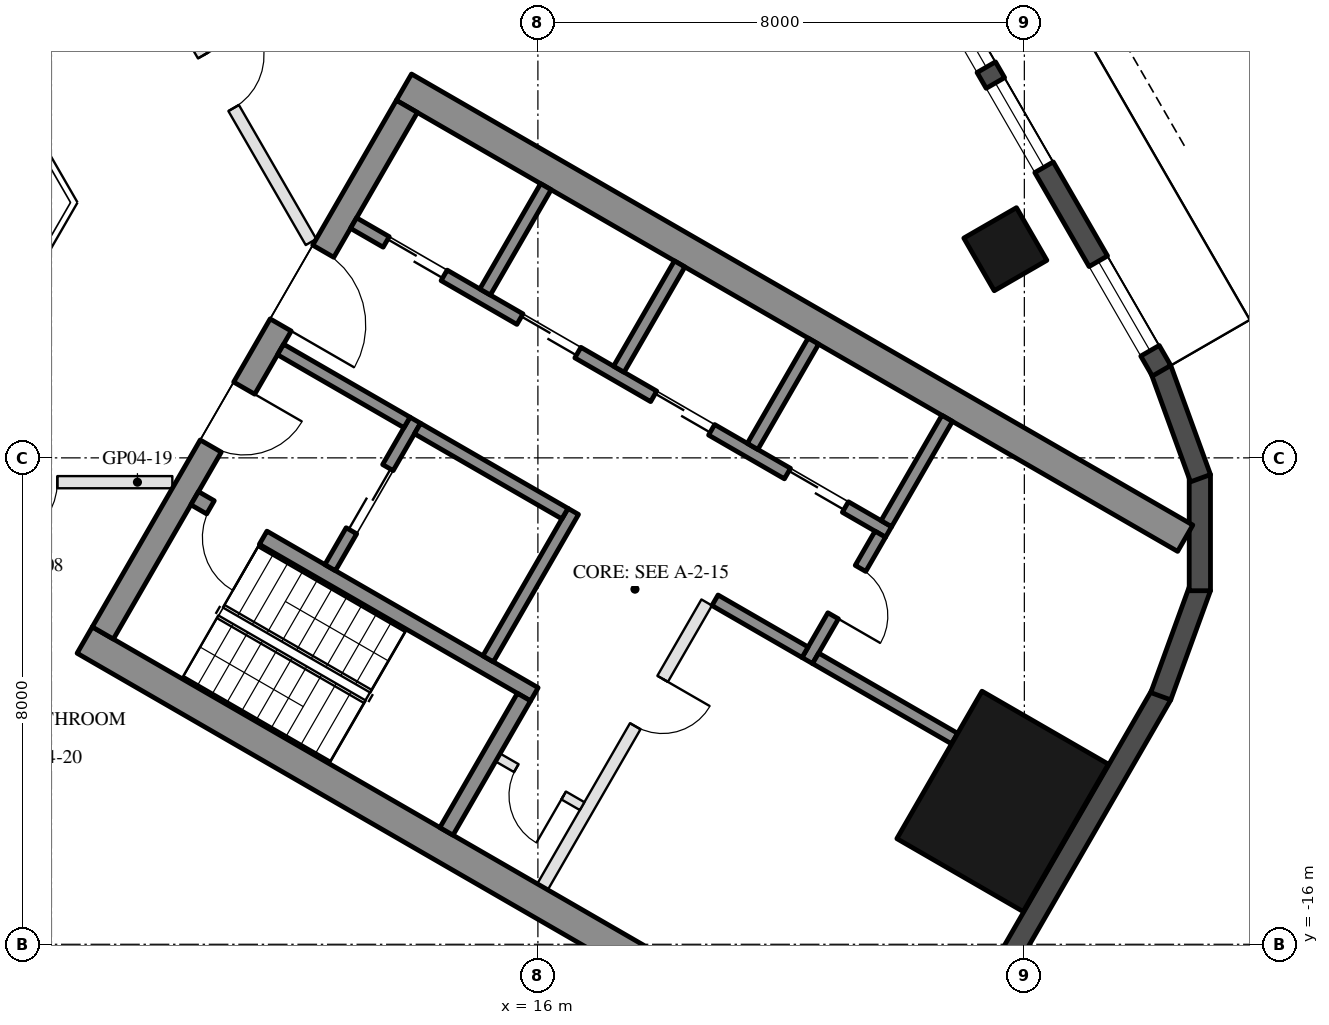
"""IFC4 building model, lengths in metres.
Left out: names, types, materials, properties, quantities, classifications, styles, units other than length and angle.
Written with IfcOpenShell. Run it as: python <this file> out.ifc"""

import sys

from ifc_helpers import new_model, si_unit, direction, frame, frame_2d, origin, origin_2d, place, context, subcontext, project, spatial, rectangle, hollow_rectangle, extrude, element, fill, save


model = new_model("IFC4")
c1 = context("Model", 3, precision=1e-05, world=origin(), true_north=direction((0.0, 1.0)))
c2 = subcontext(c1, "Body", "Model", "MODEL_VIEW")
j1 = project(units=[si_unit("LENGTHUNIT", "METRE"), si_unit("PLANEANGLEUNIT", "RADIAN")], contexts=[c1])
p1 = place(None, origin())
s1 = spatial("IfcSite", under=j1, at=p1, CompositionType="ELEMENT")
p2 = place(p1, origin())
s2 = spatial("IfcBuilding", under=s1, at=p2, CompositionType="ELEMENT")
p3 = place(p2, frame((0.0, 0.0, 76.1)))
s3 = spatial("IfcBuildingStorey", under=s2, at=p3, CompositionType="ELEMENT", Elevation=76.1)
p4 = place(p3, frame((23.688, -4.568, 0.0), z_axis=(0.0, 0.0, 1.0), x_axis=(-0.5, 0.866025403784, 0.0)))
e1 = element("IfcColumn", 1, at=p4, inside=s3, PredefinedType="COLUMN", context=c2, shape_type="SweptSolid", body=[
    extrude(hollow_rectangle(XDim=1.0, YDim=1.0, WallThickness=0.045, at=origin_2d()), origin(), (0.0, 0.0, 1.0), 3.7),
])
p5 = place(p3, frame((23.643, -13.65, 0.0), z_axis=(0.0, 0.0, 1.0), x_axis=(0.5, 0.866025403784, 0.0)))
e2 = element("IfcColumn", 2, at=p5, inside=s3, PredefinedType="COLUMN", context=c2, shape_type="SweptSolid", body=[
    extrude(hollow_rectangle(XDim=2.8, YDim=2.4, WallThickness=0.07, at=origin_2d()), origin(), (0.0, 0.0, 1.0), 3.7),
])
p6 = place(p3, frame((23.427, -16.792, 0.0), z_axis=(0.0, 0.0, 1.0), x_axis=(0.500018773155, 0.866014564827, 0.0)))
e3 = element("IfcWall", 3, at=p6, inside=s3, PredefinedType="SOLIDWALL", context=c2, shape_type="SweptSolid", body=[
    extrude(rectangle(XDim=5.658, YDim=0.35, at=frame_2d((2.829, 0.0))), origin(), (0.0, 0.0, 1.0), 3.55),
])
for number, where, z_axis, x_axis in (
    (4, (26.244, -11.92, 0.0), (0.0, 0.0, 1.0), (0.342, 0.94, 0.0)),
    (5, (26.886, -10.185, 0.0), (0.0, 0.0, 1.0), (0.0, 1.0, 0.0)),
    (6, (26.897, -8.335, 0.0), (0.0, 0.0, 1.0), (-0.342, 0.94, 0.0)),
):
    element("IfcWall", number, at=place(p3, frame(where, z_axis=z_axis, x_axis=x_axis)), inside=s3, PredefinedType="SOLIDWALL", context=c2, shape_type="SweptSolid", body=[
        extrude(rectangle(XDim=1.91, YDim=0.35, at=frame_2d((0.955, 0.0))), origin(), (0.0, 0.0, 1.0), 3.55),
    ])
p7 = place(p3, frame((26.257, -6.567, 0.0), z_axis=(0.0, 0.0, 1.0), x_axis=(-0.500023526245, 0.866011820475, 0.0)))
e7 = element("IfcWall", 7, at=p7, inside=s3, PredefinedType="SOLIDWALL", context=c2, shape_type="SweptSolid", body=[
    extrude(rectangle(XDim=11.816, YDim=0.35, at=frame_2d((5.908, 0.0))), origin(), (0.0, 0.0, 1.0), 3.55),
])
p8 = place(p7, frame((0.38, 0.0, 0.3)))
e8 = element("IfcOpeningElement", 8, at=p8, cuts=e7, PredefinedType="OPENING", context=c2, shape_type="SweptSolid", body=[
    extrude(rectangle(XDim=1.7, YDim=2.65, at=frame_2d((0.85, 1.325))), frame((0.0, 0.185, 0.0), z_axis=(0.0, -1.0, 0.0), x_axis=(1.0, 0.0, 0.0)), (0.0, 0.0, 1.0), 0.37),
])
p9 = place(p7, frame((7.666, 0.0, 0.0)))
e9 = element("IfcOpeningElement", 9, at=p9, cuts=e7, PredefinedType="OPENING", context=c2, shape_type="SweptSolid", body=[
    extrude(rectangle(XDim=2.4, YDim=2.4, at=frame_2d((1.2, 1.2))), frame((0.0, 0.185, 0.0), z_axis=(0.0, -1.0, 0.0), x_axis=(1.0, 0.0, 0.0)), (0.0, 0.0, 1.0), 0.37),
])
p10 = place(p7, frame((3.865, 0.0, 0.3)))
e10 = element("IfcOpeningElement", 10, at=p10, cuts=e7, PredefinedType="OPENING", context=c2, shape_type="SweptSolid", body=[
    extrude(rectangle(XDim=1.6, YDim=2.65, at=frame_2d((0.8, 1.325))), frame((0.0, 0.185, 0.0), z_axis=(0.0, -1.0, 0.0), x_axis=(1.0, 0.0, 0.0)), (0.0, 0.0, 1.0), 0.37),
])
p11 = place(p7, frame((5.765, 0.0, 0.3)))
e11 = element("IfcOpeningElement", 11, at=p11, cuts=e7, PredefinedType="OPENING", context=c2, shape_type="SweptSolid", body=[
    extrude(rectangle(XDim=1.6, YDim=2.65, at=frame_2d((0.8, 1.325))), frame((0.0, 0.185, 0.0), z_axis=(0.0, -1.0, 0.0), x_axis=(1.0, 0.0, 0.0)), (0.0, 0.0, 1.0), 0.37),
])
for number, where, z_axis, x_axis in (
    (12, (8.547, -10.997, 0.0), (0.0, 0.0, 1.0), (0.866, -0.5, 0.0)),
    (13, (13.797, -1.903, 0.0), (0.0, 0.0, 1.0), (0.866, -0.5, 0.0)),
):
    element("IfcWall", number, at=place(p3, frame(where, z_axis=z_axis, x_axis=x_axis)), inside=s3, PredefinedType="SHEAR", context=c2, shape_type="SweptSolid", body=[
        extrude(rectangle(XDim=14.837, YDim=0.5, at=frame_2d((7.418, 0.0))), origin(), (0.0, 0.0, 1.0), 3.5),
    ])
p12 = place(p3, frame((8.845, -10.88, 0.0), z_axis=(0.0, 0.0, 1.0), x_axis=(0.500004234368, 0.866022959057, 0.0)))
e14 = element("IfcWall", 14, at=p12, inside=s3, PredefinedType="SHEAR", context=c2, shape_type="SweptSolid", body=[
    extrude(rectangle(XDim=10.0, YDim=0.4, at=frame_2d((5.0, 0.0))), origin(), (0.0, 0.0, 1.0), 3.5),
])
p13 = place(p12, frame((3.55, 0.0, 0.0)))
e15 = element("IfcOpeningElement", 15, at=p13, cuts=e14, PredefinedType="OPENING", context=c2, shape_type="SweptSolid", body=[
    extrude(rectangle(XDim=1.1, YDim=2.1, at=frame_2d((0.55, 1.05))), frame((0.0, 0.21, 0.0), z_axis=(0.0, -1.0, 0.0), x_axis=(1.0, 0.0, 0.0)), (0.0, 0.0, 1.0), 0.42),
])
p14 = place(p12, frame((5.85, 0.0, 0.0)))
e16 = element("IfcOpeningElement", 16, at=p14, cuts=e14, PredefinedType="OPENING", context=c2, shape_type="SweptSolid", body=[
    extrude(rectangle(XDim=1.4, YDim=2.1, at=frame_2d((0.7, 1.05))), frame((0.0, 0.21, 0.0), z_axis=(0.0, -1.0, 0.0), x_axis=(1.0, 0.0, 0.0)), (0.0, 0.0, 1.0), 0.42),
])
p15 = place(p3, frame((10.356, -8.664, 0.0), z_axis=(0.0, 0.0, 1.0), x_axis=(0.866028629588, -0.499994412703, 0.0)))
e17 = element("IfcWall", 17, at=p15, inside=s3, PredefinedType="SHEAR", context=c2, shape_type="SweptSolid", body=[
    extrude(rectangle(XDim=6.45, YDim=0.25, at=frame_2d((3.225, 0.0))), origin(), (0.0, 0.0, 1.0), 3.5),
])
p16 = place(p15, frame((0.3, 0.0, 0.0)))
e18 = element("IfcOpeningElement", 18, at=p16, cuts=e17, PredefinedType="OPENING", context=c2, shape_type="SweptSolid", body=[
    extrude(rectangle(XDim=1.0, YDim=2.1, at=frame_2d((0.5, 1.05))), frame((0.0, 0.135, 0.0), z_axis=(0.0, -1.0, 0.0), x_axis=(1.0, 0.0, 0.0)), (0.0, 0.0, 1.0), 0.27),
])
p17 = place(p3, frame((14.496, -14.143, 0.0), z_axis=(0.0, 0.0, 1.0), x_axis=(0.500062241894, 0.865989465428, 0.0)))
e19 = element("IfcWall", 19, at=p17, inside=s3, PredefinedType="SHEAR", context=c2, shape_type="SweptSolid", body=[
    extrude(rectangle(XDim=2.55, YDim=0.25, at=frame_2d((1.275, 0.0))), origin(), (0.0, 0.0, 1.0), 3.5),
])
p18 = place(p3, frame((15.181, -11.305, 0.0), z_axis=(0.0, 0.0, 1.0), x_axis=(0.49994636267, 0.866056369097, 0.0)))
e20 = element("IfcWall", 20, at=p18, inside=s3, PredefinedType="SHEAR", context=c2, shape_type="SweptSolid", body=[
    extrude(rectangle(XDim=2.8, YDim=0.2, at=frame_2d((1.4, 0.0))), origin(), (0.0, 0.0, 1.0), 3.5),
])
p19 = place(p3, frame((12.583, -9.805, 0.0), z_axis=(0.0, 0.0, 1.0), x_axis=(0.49994636267, 0.866056369097, 0.0)))
e21 = element("IfcWall", 21, at=p19, inside=s3, PredefinedType="SHEAR", context=c2, shape_type="SweptSolid", body=[
    extrude(rectangle(XDim=2.8, YDim=0.2, at=frame_2d((1.4, 0.0))), origin(), (0.0, 0.0, 1.0), 3.5),
])
p20 = place(p19, frame((0.7, 0.0, 0.0)))
e22 = element("IfcOpeningElement", 22, at=p20, cuts=e21, PredefinedType="OPENING", context=c2, shape_type="SweptSolid", body=[
    extrude(rectangle(XDim=1.2, YDim=2.1, at=frame_2d((0.6, 1.05))), frame((0.0, 0.11, 0.0), z_axis=(0.0, -1.0, 0.0), x_axis=(1.0, 0.0, 0.0)), (0.0, 0.0, 1.0), 0.22),
])
p21 = place(p3, frame((11.768, -6.217, 0.0), z_axis=(0.0, 0.0, 1.0), x_axis=(0.866050077142, -0.499957262057, 0.0)))
e23 = element("IfcWall", 23, at=p21, inside=s3, PredefinedType="SHEAR", context=c2, shape_type="SweptSolid", body=[
    extrude(rectangle(XDim=2.4, YDim=0.2, at=frame_2d((1.2, 0.0))), origin(), (0.0, 0.0, 1.0), 3.5),
])
p22 = place(p3, frame((14.02, -7.517, 0.0), z_axis=(0.0, 0.0, 1.0), x_axis=(0.866034573852, -0.49998411664, 0.0)))
e24 = element("IfcWall", 24, at=p22, inside=s3, PredefinedType="SHEAR", context=c2, shape_type="SweptSolid", body=[
    extrude(rectangle(XDim=2.8, YDim=0.2, at=frame_2d((1.4, 0.0))), origin(), (0.0, 0.0, 1.0), 3.5),
])
p23 = place(p3, frame((12.968, -4.138, 0.0), z_axis=(0.0, 0.0, 1.0), x_axis=(0.866028328073, -0.49999493495, 0.0)))
e25 = element("IfcWall", 25, at=p23, inside=s3, PredefinedType="SHEAR", context=c2, shape_type="SweptSolid", body=[
    extrude(rectangle(XDim=10.16, YDim=0.2, at=frame_2d((5.08, 0.0))), origin(), (0.0, 0.0, 1.0), 3.5),
])
p24 = place(p23, frame((0.62, 0.0, 0.0)))
e26 = element("IfcOpeningElement", 26, at=p24, cuts=e25, PredefinedType="OPENING", context=c2, shape_type="SweptSolid", body=[
    extrude(rectangle(XDim=1.1, YDim=2.1, at=frame_2d((0.55, 1.05))), frame((0.0, 0.11, 0.0), z_axis=(0.0, -1.0, 0.0), x_axis=(1.0, 0.0, 0.0)), (0.0, 0.0, 1.0), 0.22),
])
p25 = place(p23, frame((3.16, 0.0, 0.0)))
e27 = element("IfcOpeningElement", 27, at=p25, cuts=e25, PredefinedType="OPENING", context=c2, shape_type="SweptSolid", body=[
    extrude(rectangle(XDim=1.1, YDim=2.1, at=frame_2d((0.55, 1.05))), frame((0.0, 0.11, 0.0), z_axis=(0.0, -1.0, 0.0), x_axis=(1.0, 0.0, 0.0)), (0.0, 0.0, 1.0), 0.22),
])
p26 = place(p23, frame((5.7, 0.0, 0.0)))
e28 = element("IfcOpeningElement", 28, at=p26, cuts=e25, PredefinedType="OPENING", context=c2, shape_type="SweptSolid", body=[
    extrude(rectangle(XDim=1.1, YDim=2.1, at=frame_2d((0.55, 1.05))), frame((0.0, 0.11, 0.0), z_axis=(0.0, -1.0, 0.0), x_axis=(1.0, 0.0, 0.0)), (0.0, 0.0, 1.0), 0.22),
])
p27 = place(p23, frame((8.24, 0.0, 0.0)))
e29 = element("IfcOpeningElement", 29, at=p27, cuts=e25, PredefinedType="OPENING", context=c2, shape_type="SweptSolid", body=[
    extrude(rectangle(XDim=1.1, YDim=2.1, at=frame_2d((0.55, 1.05))), frame((0.0, 0.11, 0.0), z_axis=(0.0, -1.0, 0.0), x_axis=(1.0, 0.0, 0.0)), (0.0, 0.0, 1.0), 0.22),
])
p28 = place(p3, frame((20.43, -11.333, 0.0), z_axis=(0.0, 0.0, 1.0), x_axis=(0.500001309137, 0.866024647952, 0.0)))
e30 = element("IfcWall", 30, at=p28, inside=s3, PredefinedType="SHEAR", context=c2, shape_type="SweptSolid", body=[
    extrude(rectangle(XDim=2.4, YDim=0.2, at=frame_2d((1.2, 0.0))), origin(), (0.0, 0.0, 1.0), 3.5),
])
p29 = place(p28, frame((0.85, 0.0, 0.0)))
e31 = element("IfcOpeningElement", 31, at=p29, cuts=e30, PredefinedType="OPENING", context=c2, shape_type="SweptSolid", body=[
    extrude(rectangle(XDim=0.9, YDim=2.1, at=frame_2d((0.45, 1.05))), frame((0.0, 0.11, 0.0), z_axis=(0.0, -1.0, 0.0), x_axis=(1.0, 0.0, 0.0)), (0.0, 0.0, 1.0), 0.22),
])
p30 = place(p3, frame((18.913, -10.342, 0.0), z_axis=(0.0, 0.0, 1.0), x_axis=(0.866038183914, -0.499977863513, 0.0)))
e32 = element("IfcWall", 32, at=p30, inside=s3, PredefinedType="SHEAR", context=c2, shape_type="SweptSolid", body=[
    extrude(rectangle(XDim=1.71, YDim=0.2, at=frame_2d((0.855, 0.0))), origin(), (0.0, 0.0, 1.0), 3.5),
])
for number, where, z_axis, x_axis in (
    (33, (15.131, -5.272, 0.0), (0.0, 0.0, 1.0), (0.5, 0.866, 0.0)),
    (34, (17.331, -6.542, 0.0), (0.0, 0.0, 1.0), (0.5, 0.866, 0.0)),
    (35, (19.531, -7.812, 0.0), (0.0, 0.0, 1.0), (0.5, 0.866, 0.0)),
    (36, (21.73, -9.082, 0.0), (0.0, 0.0, 1.0), (0.5, 0.866, 0.0)),
):
    element("IfcWall", number, at=place(p3, frame(where, z_axis=z_axis, x_axis=x_axis)), inside=s3, PredefinedType="SHEAR", context=c2, shape_type="SweptSolid", body=[
        extrude(rectangle(XDim=2.0, YDim=0.2, at=frame_2d((1.0, 0.0))), origin(), (0.0, 0.0, 1.0), 3.5),
    ])
p31 = place(p3, frame((20.567, -11.297, 0.0), z_axis=(0.0, 0.0, 1.0), x_axis=(0.866060851709, -0.499938597367, 0.0)))
e37 = element("IfcWall", 37, at=p31, inside=s3, PredefinedType="SHEAR", context=c2, shape_type="SweptSolid", body=[
    extrude(rectangle(XDim=2.64, YDim=0.2, at=frame_2d((1.32, 0.0))), origin(), (0.0, 0.0, 1.0), 3.5),
])
p32 = place(p3, frame((16.076, -15.055, 0.0), z_axis=(0.0, 0.0, 1.0), x_axis=(0.499995103361, 0.866028230842, 0.0)))
e38 = element("IfcWall", 38, at=p32, inside=s3, PredefinedType="PARTITIONING", context=c2, shape_type="SweptSolid", body=[
    extrude(rectangle(XDim=5.4, YDim=0.2, at=frame_2d((2.7, 0.0))), origin(), (0.0, 0.0, 1.0), 3.5),
])
p33 = place(p32, frame((3.05, 0.0, 0.0)))
e39 = element("IfcOpeningElement", 39, at=p33, cuts=e38, PredefinedType="OPENING", context=c2, shape_type="SweptSolid", body=[
    extrude(rectangle(XDim=0.9, YDim=2.1, at=frame_2d((0.45, 1.05))), frame((0.0, 0.11, 0.0), z_axis=(0.0, -1.0, 0.0), x_axis=(1.0, 0.0, 0.0)), (0.0, 0.0, 1.0), 0.22),
])
p34 = place(p3, frame((15.342, -12.928, 0.0), z_axis=(0.0, 0.0, 1.0), x_axis=(0.865989903783, -0.500061482766, 0.0)))
e40 = element("IfcWall", 40, at=p34, inside=s3, PredefinedType="PARTITIONING", context=c2, shape_type="SweptSolid", body=[
    extrude(rectangle(XDim=1.6, YDim=0.15, at=frame_2d((0.8, 0.0))), origin(), (0.0, 0.0, 1.0), 3.5),
])
p35 = place(p34, frame((0.35, 0.0, 0.0)))
e41 = element("IfcOpeningElement", 41, at=p35, cuts=e40, PredefinedType="OPENING", context=c2, shape_type="SweptSolid", body=[
    extrude(rectangle(XDim=0.9, YDim=2.1, at=frame_2d((0.45, 1.05))), frame((0.0, 0.085, 0.0), z_axis=(0.0, -1.0, 0.0), x_axis=(1.0, 0.0, 0.0)), (0.0, 0.0, 1.0), 0.17),
])
p36 = place(p3, frame((9.988, -8.4, 0.0), z_axis=(0.0, 0.0, 1.0), x_axis=(-1.0, 0.0, 0.0)))
e42 = element("IfcWall", 42, at=p36, inside=s3, PredefinedType="PARTITIONING", context=c2, shape_type="SweptSolid", body=[
    extrude(rectangle(XDim=4.783, YDim=0.2, at=frame_2d((2.392, 0.0))), origin(), (0.0, 0.0, 1.0), 2.95),
])
p37 = place(p36, frame((1.892, 0.0, 0.0)))
e43 = element("IfcOpeningElement", 43, at=p37, cuts=e42, PredefinedType="OPENING", context=c2, shape_type="SweptSolid", body=[
    extrude(rectangle(XDim=1.0, YDim=2.1, at=frame_2d((0.5, 1.05))), frame((0.0, 0.11, 0.0), z_axis=(0.0, -1.0, 0.0), x_axis=(1.0, 0.0, 0.0)), (0.0, 0.0, 1.0), 0.22),
])
p38 = place(p3, frame((9.224, 0.824, 0.0), z_axis=(0.0, 0.0, 1.0), x_axis=(0.500019749946, -0.866014000848, 0.0)))
e44 = element("IfcWall", 44, at=p38, inside=s3, PredefinedType="PARTITIONING", context=c2, shape_type="SweptSolid", body=[
    extrude(rectangle(XDim=6.09, YDim=0.2, at=frame_2d((3.045, 0.0))), origin(), (0.0, 0.0, 1.0), 2.95),
])
p39 = place(p38, frame((2.545, 0.0, 0.0)))
e45 = element("IfcOpeningElement", 45, at=p39, cuts=e44, PredefinedType="OPENING", context=c2, shape_type="SweptSolid", body=[
    extrude(rectangle(XDim=1.0, YDim=2.1, at=frame_2d((0.5, 1.05))), frame((0.0, 0.11, 0.0), z_axis=(0.0, -1.0, 0.0), x_axis=(1.0, 0.0, 0.0)), (0.0, 0.0, 1.0), 0.22),
])
p40 = place(p8, origin())
e46 = element("IfcWindow", 46, at=p40, inside=s3, PartitioningType="SINGLE_PANEL", PredefinedType="WINDOW", context=c2, shape_type="SweptSolid", body=[
    extrude(rectangle(XDim=1.7, YDim=2.65, at=frame_2d((0.85, 1.325))), frame((0.0, 0.03, 0.0), z_axis=(0.0, -1.0, 0.0), x_axis=(1.0, 0.0, 0.0)), (0.0, 0.0, 1.0), 0.06),
])
fill(e8, e46)
p41 = place(p10, origin())
e47 = element("IfcWindow", 47, at=p41, inside=s3, PartitioningType="SINGLE_PANEL", PredefinedType="WINDOW", context=c2, shape_type="SweptSolid", body=[
    extrude(rectangle(XDim=1.6, YDim=2.65, at=frame_2d((0.8, 1.325))), frame((0.0, 0.03, 0.0), z_axis=(0.0, -1.0, 0.0), x_axis=(1.0, 0.0, 0.0)), (0.0, 0.0, 1.0), 0.06),
])
fill(e10, e47)
p42 = place(p11, origin())
e48 = element("IfcWindow", 48, at=p42, inside=s3, PartitioningType="SINGLE_PANEL", PredefinedType="WINDOW", context=c2, shape_type="SweptSolid", body=[
    extrude(rectangle(XDim=1.6, YDim=2.65, at=frame_2d((0.8, 1.325))), frame((0.0, 0.03, 0.0), z_axis=(0.0, -1.0, 0.0), x_axis=(1.0, 0.0, 0.0)), (0.0, 0.0, 1.0), 0.06),
])
fill(e11, e48)
p43 = place(p20, origin())
e49 = element("IfcDoor", 49, at=p43, inside=s3, OperationType="DOUBLE_DOOR_SLIDING", PredefinedType="DOOR", context=c2, shape_type="SweptSolid", body=[
    extrude(rectangle(XDim=1.2, YDim=2.1, at=frame_2d((0.6, 1.05))), frame((0.0, 0.025, 0.0), z_axis=(0.0, -1.0, 0.0), x_axis=(1.0, 0.0, 0.0)), (0.0, 0.0, 1.0), 0.05),
])
fill(e22, e49)
p44 = place(p35, frame((0.9, 0.0, 0.0), z_axis=(0.0, 0.0, 1.0), x_axis=(-1.0, 0.0, 0.0)))
e50 = element("IfcDoor", 50, at=p44, inside=s3, OperationType="SINGLE_SWING_LEFT", PredefinedType="DOOR", context=c2, shape_type="SweptSolid", body=[
    extrude(rectangle(XDim=0.9, YDim=2.1, at=frame_2d((0.45, 1.05))), frame((0.0, 0.025, 0.0), z_axis=(0.0, -1.0, 0.0), x_axis=(1.0, 0.0, 0.0)), (0.0, 0.0, 1.0), 0.05),
])
fill(e41, e50)
p45 = place(p24, origin())
e51 = element("IfcDoor", 51, at=p45, inside=s3, OperationType="DOUBLE_DOOR_SLIDING", PredefinedType="DOOR", context=c2, shape_type="SweptSolid", body=[
    extrude(rectangle(XDim=1.1, YDim=2.1, at=frame_2d((0.55, 1.05))), frame((0.0, 0.025, 0.0), z_axis=(0.0, -1.0, 0.0), x_axis=(1.0, 0.0, 0.0)), (0.0, 0.0, 1.0), 0.05),
])
fill(e26, e51)
p46 = place(p25, origin())
e52 = element("IfcDoor", 52, at=p46, inside=s3, OperationType="DOUBLE_DOOR_SLIDING", PredefinedType="DOOR", context=c2, shape_type="SweptSolid", body=[
    extrude(rectangle(XDim=1.1, YDim=2.1, at=frame_2d((0.55, 1.05))), frame((0.0, 0.025, 0.0), z_axis=(0.0, -1.0, 0.0), x_axis=(1.0, 0.0, 0.0)), (0.0, 0.0, 1.0), 0.05),
])
fill(e27, e52)
p47 = place(p26, origin())
e53 = element("IfcDoor", 53, at=p47, inside=s3, OperationType="DOUBLE_DOOR_SLIDING", PredefinedType="DOOR", context=c2, shape_type="SweptSolid", body=[
    extrude(rectangle(XDim=1.1, YDim=2.1, at=frame_2d((0.55, 1.05))), frame((0.0, 0.025, 0.0), z_axis=(0.0, -1.0, 0.0), x_axis=(1.0, 0.0, 0.0)), (0.0, 0.0, 1.0), 0.05),
])
fill(e28, e53)
p48 = place(p27, origin())
e54 = element("IfcDoor", 54, at=p48, inside=s3, OperationType="DOUBLE_DOOR_SLIDING", PredefinedType="DOOR", context=c2, shape_type="SweptSolid", body=[
    extrude(rectangle(XDim=1.1, YDim=2.1, at=frame_2d((0.55, 1.05))), frame((0.0, 0.025, 0.0), z_axis=(0.0, -1.0, 0.0), x_axis=(1.0, 0.0, 0.0)), (0.0, 0.0, 1.0), 0.05),
])
fill(e29, e54)
p49 = place(p29, frame((0.9, 0.0, 0.0), z_axis=(0.0, 0.0, 1.0), x_axis=(-1.0, 0.0, 0.0)))
e55 = element("IfcDoor", 55, at=p49, inside=s3, OperationType="SINGLE_SWING_RIGHT", PredefinedType="DOOR", context=c2, shape_type="SweptSolid", body=[
    extrude(rectangle(XDim=0.9, YDim=2.1, at=frame_2d((0.45, 1.05))), frame((0.0, 0.025, 0.0), z_axis=(0.0, -1.0, 0.0), x_axis=(1.0, 0.0, 0.0)), (0.0, 0.0, 1.0), 0.05),
])
fill(e31, e55)
p50 = place(p33, frame((0.9, 0.0, 0.0), z_axis=(0.0, 0.0, 1.0), x_axis=(-1.0, 0.0, 0.0)))
e56 = element("IfcDoor", 56, at=p50, inside=s3, OperationType="SINGLE_SWING_LEFT", PredefinedType="DOOR", context=c2, shape_type="SweptSolid", body=[
    extrude(rectangle(XDim=0.9, YDim=2.1, at=frame_2d((0.45, 1.05))), frame((0.0, 0.025, 0.0), z_axis=(0.0, -1.0, 0.0), x_axis=(1.0, 0.0, 0.0)), (0.0, 0.0, 1.0), 0.05),
])
fill(e39, e56)
p51 = place(p13, frame((1.1, 0.0, 0.0), z_axis=(0.0, 0.0, 1.0), x_axis=(-1.0, 0.0, 0.0)))
e57 = element("IfcDoor", 57, at=p51, inside=s3, OperationType="SINGLE_SWING_LEFT", PredefinedType="DOOR", context=c2, shape_type="SweptSolid", body=[
    extrude(rectangle(XDim=1.1, YDim=2.1, at=frame_2d((0.55, 1.05))), frame((0.0, 0.025, 0.0), z_axis=(0.0, -1.0, 0.0), x_axis=(1.0, 0.0, 0.0)), (0.0, 0.0, 1.0), 0.05),
])
fill(e15, e57)
p52 = place(p14, frame((1.4, 0.0, 0.0), z_axis=(0.0, 0.0, 1.0), x_axis=(-1.0, 0.0, 0.0)))
e58 = element("IfcDoor", 58, at=p52, inside=s3, OperationType="DOUBLE_DOOR_SINGLE_SWING", PredefinedType="DOOR", context=c2, shape_type="SweptSolid", body=[
    extrude(rectangle(XDim=1.4, YDim=2.1, at=frame_2d((0.7, 1.05))), frame((0.0, 0.025, 0.0), z_axis=(0.0, -1.0, 0.0), x_axis=(1.0, 0.0, 0.0)), (0.0, 0.0, 1.0), 0.05),
])
fill(e16, e58)
p53 = place(p16, frame((1.0, 0.0, 0.0), z_axis=(0.0, 0.0, 1.0), x_axis=(-1.0, 0.0, 0.0)))
e59 = element("IfcDoor", 59, at=p53, inside=s3, OperationType="SINGLE_SWING_LEFT", PredefinedType="DOOR", context=c2, shape_type="SweptSolid", body=[
    extrude(rectangle(XDim=1.0, YDim=2.1, at=frame_2d((0.5, 1.05))), frame((0.0, 0.025, 0.0), z_axis=(0.0, -1.0, 0.0), x_axis=(1.0, 0.0, 0.0)), (0.0, 0.0, 1.0), 0.05),
])
fill(e18, e59)
p54 = place(p37, origin())
e60 = element("IfcDoor", 60, at=p54, inside=s3, OperationType="SINGLE_SWING_RIGHT", PredefinedType="DOOR", context=c2, shape_type="SweptSolid", body=[
    extrude(rectangle(XDim=1.0, YDim=2.1, at=frame_2d((0.5, 1.05))), frame((0.0, 0.025, 0.0), z_axis=(0.0, -1.0, 0.0), x_axis=(1.0, 0.0, 0.0)), (0.0, 0.0, 1.0), 0.05),
])
fill(e43, e60)
p55 = place(p39, origin())
e61 = element("IfcDoor", 61, at=p55, inside=s3, OperationType="SINGLE_SWING_LEFT", PredefinedType="DOOR", context=c2, shape_type="SweptSolid", body=[
    extrude(rectangle(XDim=1.0, YDim=2.1, at=frame_2d((0.5, 1.05))), frame((0.0, 0.025, 0.0), z_axis=(0.0, -1.0, 0.0), x_axis=(1.0, 0.0, 0.0)), (0.0, 0.0, 1.0), 0.05),
])
fill(e45, e61)
save(model, sys.argv[1])
